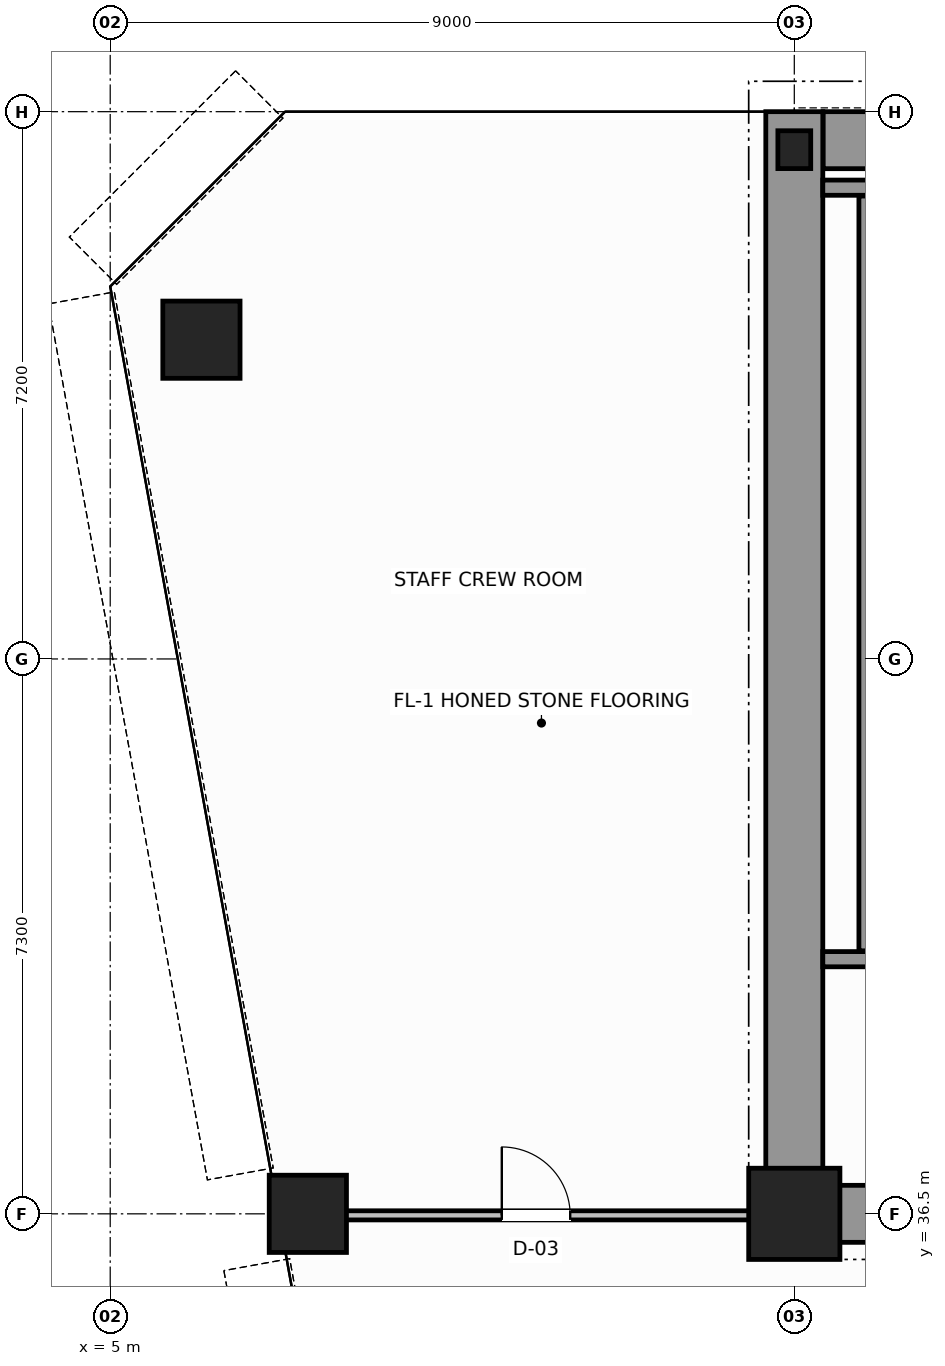
"""IFC4 building model, lengths in metres.
Left out: names, types, materials, properties, quantities, classifications, styles, units other than length and angle.
Written with IfcOpenShell. Run it as: python <this file> out.ifc"""

import sys

from ifc_helpers import new_model, si_unit, direction, frame, frame_2d, origin, origin_2d, place, context, subcontext, project, spatial, rectangle, hollow_circle, i_section, extrude, source, transform, mapped, element, fill, save


model = new_model("IFC4")
c1 = context("Model", 3, precision=1e-05, world=origin(), true_north=direction((0.0, 1.0)))
c2 = subcontext(c1, "Body", "Model", "MODEL_VIEW")
j1 = project(units=[si_unit("LENGTHUNIT", "METRE"), si_unit("PLANEANGLEUNIT", "RADIAN")], contexts=[c1])
p1 = place(None, origin())
s1 = spatial("IfcSite", under=j1, at=p1, CompositionType="ELEMENT")
p2 = place(p1, origin())
s2 = spatial("IfcBuilding", under=s1, at=p2, CompositionType="ELEMENT")
p3 = place(p2, frame((0.0, 0.0, 141.4)))
s3 = spatial("IfcBuildingStorey", under=s2, at=p3, CompositionType="ELEMENT", Elevation=141.4)
m1 = source(origin(), c2, "Body", "SweptSolid", [
    extrude(rectangle(XDim=1.2, YDim=1.2, at=origin_2d()), origin(), (0.0, 0.0, 1.0), 3.8),
])
p4 = place(p3, frame((14.0, 36.5, 0.0), z_axis=(0.0, 0.0, 1.0), x_axis=(1.0, 0.0, 0.0)))
e1 = element("IfcColumn", 1, at=p4, inside=s3, PredefinedType="COLUMN", context=c2, shape_type="MappedRepresentation", body=[
    mapped(m1, transform((0.0, 0.0, 0.0), scale=1.0)),
])
m2 = source(origin(), c2, "Body", "SweptSolid", [
    extrude(i_section(OverallWidth=0.432, OverallDepth=0.498, WebThickness=0.055, FlangeThickness=0.068, FilletRadius=0.015, at=origin_2d()), origin(), (0.0, 0.0, 1.0), 3.8),
])
p5 = place(p3, frame((14.0, 50.5, 0.0), z_axis=(0.0, 0.0, 1.0), x_axis=(1.0, 0.0, 0.0)))
e2 = element("IfcColumn", 2, at=p5, inside=s3, PredefinedType="COLUMN", context=c2, shape_type="MappedRepresentation", body=[
    mapped(m2, transform((0.0, 0.0, 0.0), scale=1.0)),
])
m3 = source(origin(), c2, "Body", "SweptSolid", [
    extrude(hollow_circle(Radius=0.508, WallThickness=0.045, at=origin_2d()), origin(), (0.0, 0.0, 1.0), 3.8),
])
for number, where, z_axis, x_axis in (
    (3, (6.2, 48.0, 0.0), (0.0, 0.0, 1.0), (1.0, 0.0, 0.0)),
    (4, (7.6, 36.5, 0.0), (0.0, 0.0, 1.0), (1.0, 0.0, 0.0)),
):
    element("IfcColumn", number, at=place(p3, frame(where, z_axis=z_axis, x_axis=x_axis)), inside=s3, PredefinedType="COLUMN", context=c2, shape_type="MappedRepresentation", body=[
        mapped(m3, transform((0.0, 0.0, 0.0), scale=1.0)),
    ])
p6 = place(p3, frame((14.379, 50.625, 0.0), z_axis=(0.0, 0.0, 1.0), x_axis=(1.0, 0.0, 0.0)))
e5 = element("IfcWall", 5, at=p6, inside=s3, PredefinedType="SHEAR", context=c2, shape_type="SweptSolid", body=[
    extrude(rectangle(XDim=19.619, YDim=0.75, at=frame_2d((9.81, 0.0))), origin(), (0.0, 0.0, 1.0), 3.8),
])
p7 = place(p3, frame((14.0, 36.5, 0.0), z_axis=(0.0, 0.0, 1.0), x_axis=(0.0, 1.0, 0.0)))
e6 = element("IfcWall", 6, at=p7, inside=s3, PredefinedType="SHEAR", context=c2, shape_type="SweptSolid", body=[
    extrude(rectangle(XDim=14.5, YDim=0.75, at=frame_2d((7.25, 0.0))), origin(), (0.0, 0.0, 1.0), 3.8),
])
p8 = place(p3, frame((14.395, 36.5, 0.0), z_axis=(0.0, 0.0, 1.0), x_axis=(1.0, 0.0, 0.0)))
e7 = element("IfcWall", 7, at=p8, inside=s3, PredefinedType="SHEAR", context=c2, shape_type="SweptSolid", body=[
    extrude(rectangle(XDim=3.805, YDim=0.75, at=frame_2d((1.902, 0.0))), origin(), (0.0, 0.0, 1.0), 2.38),
])
p9 = place(p3, frame((14.375, 39.85, 0.0), z_axis=(0.0, 0.0, 1.0), x_axis=(1.0, 0.0, 0.0)))
e8 = element("IfcWall", 8, at=p9, inside=s3, PredefinedType="SOLIDWALL", context=c2, shape_type="SweptSolid", body=[
    extrude(rectangle(XDim=4.225, YDim=0.2, at=frame_2d((2.113, 0.0))), origin(), (0.0, 0.0, 1.0), 3.8),
])
p10 = place(p9, frame((1.8, 0.0, 0.0)))
e9 = element("IfcOpeningElement", 9, at=p10, cuts=e8, PredefinedType="OPENING", context=c2, shape_type="SweptSolid", body=[
    extrude(rectangle(XDim=1.1, YDim=2.15, at=frame_2d((0.55, 1.075))), frame((0.0, 0.11, 0.0), z_axis=(0.0, -1.0, 0.0), x_axis=(1.0, 0.0, 0.0)), (0.0, 0.0, 1.0), 0.22),
])
p11 = place(p3, frame((14.375, 50.0, 0.0), z_axis=(0.0, 0.0, 1.0), x_axis=(1.0, 0.0, 0.0)))
e10 = element("IfcWall", 10, at=p11, inside=s3, PredefinedType="SOLIDWALL", context=c2, shape_type="SweptSolid", body=[
    extrude(rectangle(XDim=4.225, YDim=0.2, at=frame_2d((2.113, 0.0))), origin(), (0.0, 0.0, 1.0), 3.8),
])
p12 = place(p3, frame((14.95, 39.96, 0.0), z_axis=(0.0, 0.0, 1.0), x_axis=(0.0, 1.0, 0.0)))
e11 = element("IfcWall", 11, at=p12, inside=s3, PredefinedType="SOLIDWALL", context=c2, shape_type="SweptSolid", body=[
    extrude(rectangle(XDim=9.93, YDim=0.2, at=frame_2d((4.965, 0.0))), origin(), (0.0, 0.0, 1.0), 3.8),
])
p13 = place(p3, frame((7.263, 36.48, 0.0), z_axis=(0.0, 0.0, 1.0), x_axis=(1.0, 0.0, 0.0)))
e12 = element("IfcWall", 12, at=p13, inside=s3, PredefinedType="PARTITIONING", context=c2, shape_type="SweptSolid", body=[
    extrude(rectangle(XDim=6.677, YDim=0.12, at=frame_2d((3.339, 0.0))), origin(), (0.0, 0.0, 1.0), 2.87),
])
p14 = place(p13, frame((2.889, 0.0, 0.0)))
e13 = element("IfcOpeningElement", 13, at=p14, cuts=e12, PredefinedType="OPENING", context=c2, shape_type="SweptSolid", body=[
    extrude(rectangle(XDim=0.9, YDim=2.15, at=frame_2d((0.45, 1.075))), frame((0.0, 0.07, 0.0), z_axis=(0.0, -1.0, 0.0), x_axis=(1.0, 0.0, 0.0)), (0.0, 0.0, 1.0), 0.14),
])
m4 = source(origin(), c2, "Body", "SweptSolid", [
    extrude(rectangle(XDim=0.9, YDim=2.15, at=frame_2d((0.45, 1.075))), frame((0.0, 0.025, 0.0), z_axis=(0.0, -1.0, 0.0), x_axis=(1.0, 0.0, 0.0)), (0.0, 0.0, 1.0), 0.05),
])
p15 = place(p14, origin())
e14 = element("IfcDoor", 14, at=p15, inside=s3, OperationType="SINGLE_SWING_LEFT", PredefinedType="DOOR", context=c2, shape_type="MappedRepresentation", body=[
    mapped(m4, transform((0.0, 0.0, 0.0), scale=1.0)),
])
fill(e13, e14)
save(model, sys.argv[1])
